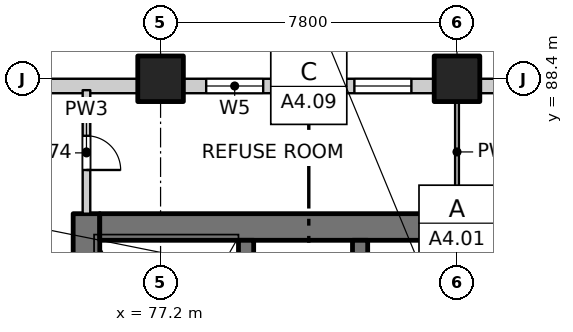
"""IFC4 building model, lengths in metres.
Left out: names, types, materials, properties, quantities, classifications, styles, units other than length and angle.
Written with IfcOpenShell. Run it as: python <this file> out.ifc"""

import sys

from ifc_helpers import new_model, si_unit, direction, frame, frame_2d, origin, origin_2d, place, context, subcontext, project, spatial, rectangle, extrude, element, fill, save


model = new_model("IFC4")
c1 = context("Model", 3, precision=1e-05, world=origin(), true_north=direction((0.0, 1.0)))
c2 = subcontext(c1, "Body", "Model", "MODEL_VIEW")
j1 = project(units=[si_unit("LENGTHUNIT", "METRE"), si_unit("PLANEANGLEUNIT", "RADIAN")], contexts=[c1])
p1 = place(None, origin())
s1 = spatial("IfcSite", under=j1, at=p1, CompositionType="ELEMENT")
p2 = place(p1, origin())
s2 = spatial("IfcBuilding", under=s1, at=p2, CompositionType="ELEMENT")
p3 = place(p2, frame((0.0, 0.0, 10.5)))
s3 = spatial("IfcBuildingStorey", under=s2, at=p3, CompositionType="ELEMENT", Elevation=10.5)
for number, where, z_axis, x_axis in (
    (1, (77.2, 88.4, -0.3), (0.0, 0.0, 1.0), (1.0, 0.0, 0.0)),
    (2, (85.0, 88.4, -0.3), (0.0, 0.0, 1.0), (1.0, 0.0, 0.0)),
):
    element("IfcColumn", number, at=place(p3, frame(where, z_axis=z_axis, x_axis=x_axis)), inside=s3, PredefinedType="COLUMN", context=c2, shape_type="SweptSolid", body=[
        extrude(rectangle(XDim=1.2, YDim=1.2, at=origin_2d()), origin(), (0.0, 0.0, 1.0), 4.45),
    ])
p4 = place(p3, frame((75.25, 77.3, -0.3), z_axis=(0.0, 0.0, 1.0), x_axis=(0.0, 1.0, 0.0)))
e3 = element("IfcWall", 3, at=p4, inside=s3, PredefinedType="SOLIDWALL", context=c2, shape_type="SweptSolid", body=[
    extrude(rectangle(XDim=7.55, YDim=0.7, at=frame_2d((3.775, 0.0))), origin(), (0.0, 0.0, 1.0), 4.45),
])
p5 = place(p4, frame((0.3, 0.0, 0.3)))
e4 = element("IfcOpeningElement", 4, at=p5, cuts=e3, PredefinedType="OPENING", context=c2, shape_type="SweptSolid", body=[
    extrude(rectangle(XDim=1.2, YDim=2.1, at=frame_2d((0.6, 1.05))), frame((0.0, 0.36, 0.0), z_axis=(0.0, -1.0, 0.0), x_axis=(1.0, 0.0, 0.0)), (0.0, 0.0, 1.0), 0.72),
])
p6 = place(p3, frame((75.6, 84.5, -0.3), z_axis=(0.0, 0.0, 1.0), x_axis=(1.0, 0.0, 0.0)))
e5 = element("IfcWall", 5, at=p6, inside=s3, PredefinedType="SOLIDWALL", context=c2, shape_type="SweptSolid", body=[
    extrude(rectangle(XDim=18.8, YDim=0.7, at=frame_2d((9.4, 0.0))), origin(), (0.0, 0.0, 1.0), 4.45),
])
p7 = place(p3, frame((79.45, 77.3, -0.3), z_axis=(0.0, 0.0, 1.0), x_axis=(0.0, 1.0, 0.0)))
e6 = element("IfcWall", 6, at=p7, inside=s3, PredefinedType="SOLIDWALL", context=c2, shape_type="SweptSolid", body=[
    extrude(rectangle(XDim=6.85, YDim=0.4, at=frame_2d((3.425, 0.0))), origin(), (0.0, 0.0, 1.0), 4.45),
])
p8 = place(p3, frame((82.45, 82.1, -0.3), z_axis=(0.0, 0.0, 1.0), x_axis=(0.0, 1.0, 0.0)))
e7 = element("IfcWall", 7, at=p8, inside=s3, PredefinedType="SOLIDWALL", context=c2, shape_type="SweptSolid", body=[
    extrude(rectangle(XDim=2.05, YDim=0.4, at=frame_2d((1.025, 0.0))), origin(), (0.0, 0.0, 1.0), 4.45),
])
p9 = place(p8, frame((0.65, 0.0, 0.3)))
e8 = element("IfcOpeningElement", 8, at=p9, cuts=e7, PredefinedType="OPENING", context=c2, shape_type="SweptSolid", body=[
    extrude(rectangle(XDim=0.9, YDim=2.1, at=frame_2d((0.45, 1.05))), frame((0.0, 0.21, 0.0), z_axis=(0.0, -1.0, 0.0), x_axis=(1.0, 0.0, 0.0)), (0.0, 0.0, 1.0), 0.42),
])
p10 = place(p3, frame((70.0, 88.21, 0.0), z_axis=(0.0, 0.0, 1.0), x_axis=(1.0, 0.0, 0.0)))
e9 = element("IfcWall", 9, at=p10, inside=s3, PredefinedType="SOLIDWALL", context=c2, shape_type="SweptSolid", body=[
    extrude(rectangle(XDim=6.6, YDim=0.38, at=frame_2d((3.3, 0.0))), origin(), (0.0, 0.0, 1.0), 3.7),
])
p11 = place(p10, frame((0.6, 0.0, 0.9)))
e10 = element("IfcOpeningElement", 10, at=p11, cuts=e9, PredefinedType="OPENING", context=c2, shape_type="SweptSolid", body=[
    extrude(rectangle(XDim=1.5, YDim=1.5, at=frame_2d((0.75, 0.75))), frame((0.0, 0.2, 0.0), z_axis=(0.0, -1.0, 0.0), x_axis=(1.0, 0.0, 0.0)), (0.0, 0.0, 1.0), 0.4),
])
p12 = place(p3, frame((77.8, 88.21, 0.0), z_axis=(0.0, 0.0, 1.0), x_axis=(1.0, 0.0, 0.0)))
e11 = element("IfcWall", 11, at=p12, inside=s3, PredefinedType="SOLIDWALL", context=c2, shape_type="SweptSolid", body=[
    extrude(rectangle(XDim=6.6, YDim=0.38, at=frame_2d((3.3, 0.0))), origin(), (0.0, 0.0, 1.0), 3.7),
])
p13 = place(p12, frame((0.6, 0.0, 0.9)))
e12 = element("IfcOpeningElement", 12, at=p13, cuts=e11, PredefinedType="OPENING", context=c2, shape_type="SweptSolid", body=[
    extrude(rectangle(XDim=1.5, YDim=1.5, at=frame_2d((0.75, 0.75))), frame((0.0, 0.2, 0.0), z_axis=(0.0, -1.0, 0.0), x_axis=(1.0, 0.0, 0.0)), (0.0, 0.0, 1.0), 0.4),
])
p14 = place(p12, frame((4.5, 0.0, 0.9)))
e13 = element("IfcOpeningElement", 13, at=p14, cuts=e11, PredefinedType="OPENING", context=c2, shape_type="SweptSolid", body=[
    extrude(rectangle(XDim=1.5, YDim=1.5, at=frame_2d((0.75, 0.75))), frame((0.0, 0.2, 0.0), z_axis=(0.0, -1.0, 0.0), x_axis=(1.0, 0.0, 0.0)), (0.0, 0.0, 1.0), 0.4),
])
p15 = place(p3, frame((85.6, 88.21, 0.0), z_axis=(0.0, 0.0, 1.0), x_axis=(1.0, 0.0, 0.0)))
e14 = element("IfcWall", 14, at=p15, inside=s3, PredefinedType="SOLIDWALL", context=c2, shape_type="SweptSolid", body=[
    extrude(rectangle(XDim=6.6, YDim=0.38, at=frame_2d((3.3, 0.0))), origin(), (0.0, 0.0, 1.0), 3.7),
])
p16 = place(p15, frame((0.6, 0.0, 0.9)))
e15 = element("IfcOpeningElement", 15, at=p16, cuts=e14, PredefinedType="OPENING", context=c2, shape_type="SweptSolid", body=[
    extrude(rectangle(XDim=1.5, YDim=1.5, at=frame_2d((0.75, 0.75))), frame((0.0, 0.2, 0.0), z_axis=(0.0, -1.0, 0.0), x_axis=(1.0, 0.0, 0.0)), (0.0, 0.0, 1.0), 0.4),
])
p17 = place(p15, frame((4.5, 0.0, 0.9)))
e16 = element("IfcOpeningElement", 16, at=p17, cuts=e14, PredefinedType="OPENING", context=c2, shape_type="SweptSolid", body=[
    extrude(rectangle(XDim=1.5, YDim=1.5, at=frame_2d((0.75, 0.75))), frame((0.0, 0.2, 0.0), z_axis=(0.0, -1.0, 0.0), x_axis=(1.0, 0.0, 0.0)), (0.0, 0.0, 1.0), 0.4),
])
p18 = place(p3, frame((75.25, 84.85, 0.0), z_axis=(0.0, 0.0, 1.0), x_axis=(0.0, 1.0, 0.0)))
e17 = element("IfcWall", 17, at=p18, inside=s3, PredefinedType="PARTITIONING", context=c2, shape_type="SweptSolid", body=[
    extrude(rectangle(XDim=3.25, YDim=0.2, at=frame_2d((1.625, 0.0))), origin(), (0.0, 0.0, 1.0), 4.15),
])
p19 = place(p18, frame((1.15, 0.0, 0.0)))
e18 = element("IfcOpeningElement", 18, at=p19, cuts=e17, PredefinedType="OPENING", context=c2, shape_type="SweptSolid", body=[
    extrude(rectangle(XDim=0.9, YDim=2.1, at=frame_2d((0.45, 1.05))), frame((0.0, 0.11, 0.0), z_axis=(0.0, -1.0, 0.0), x_axis=(1.0, 0.0, 0.0)), (0.0, 0.0, 1.0), 0.22),
])
p20 = place(p3, frame((85.0, 84.85, 0.0), z_axis=(0.0, 0.0, 1.0), x_axis=(0.0, 1.0, 0.0)))
e19 = element("IfcWall", 19, at=p20, inside=s3, PredefinedType="PARTITIONING", context=c2, shape_type="SweptSolid", body=[
    extrude(rectangle(XDim=3.25, YDim=0.1, at=frame_2d((1.625, 0.0))), origin(), (0.0, 0.0, 1.0), 4.15),
])
p21 = place(p13, origin())
e20 = element("IfcWindow", 20, at=p21, inside=s3, PartitioningType="SINGLE_PANEL", PredefinedType="WINDOW", context=c2, shape_type="SweptSolid", body=[
    extrude(rectangle(XDim=1.5, YDim=1.5, at=frame_2d((0.75, 0.75))), frame((0.0, 0.03, 0.0), z_axis=(0.0, -1.0, 0.0), x_axis=(1.0, 0.0, 0.0)), (0.0, 0.0, 1.0), 0.06),
])
fill(e12, e20)
p22 = place(p14, origin())
e21 = element("IfcWindow", 21, at=p22, inside=s3, PartitioningType="SINGLE_PANEL", PredefinedType="WINDOW", context=c2, shape_type="SweptSolid", body=[
    extrude(rectangle(XDim=1.5, YDim=1.5, at=frame_2d((0.75, 0.75))), frame((0.0, 0.03, 0.0), z_axis=(0.0, -1.0, 0.0), x_axis=(1.0, 0.0, 0.0)), (0.0, 0.0, 1.0), 0.06),
])
fill(e13, e21)
p23 = place(p19, origin())
e22 = element("IfcDoor", 22, at=p23, inside=s3, OperationType="SINGLE_SWING_RIGHT", PredefinedType="DOOR", context=c2, shape_type="SweptSolid", body=[
    extrude(rectangle(XDim=0.9, YDim=2.1, at=frame_2d((0.45, 1.05))), frame((0.0, 0.025, 0.0), z_axis=(0.0, -1.0, 0.0), x_axis=(1.0, 0.0, 0.0)), (0.0, 0.0, 1.0), 0.05),
])
fill(e18, e22)
save(model, sys.argv[1])
